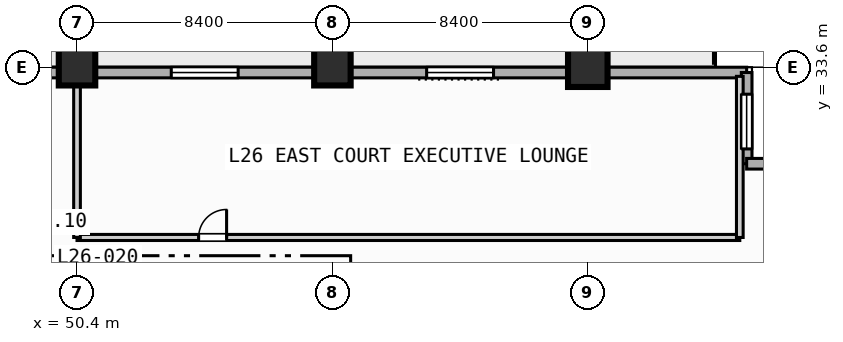
"""IFC4 building model, lengths in metres.
Left out: names, types, materials, properties, quantities, classifications, styles, units other than length and angle.
Written with IfcOpenShell. Run it as: python <this file> out.ifc"""

import sys

from ifc_helpers import new_model, si_unit, direction, frame, frame_2d, origin, origin_2d, place, context, subcontext, project, spatial, rectangle, extrude, element, fill, save


model = new_model("IFC4")
c1 = context("Model", 3, precision=1e-05, world=origin(), true_north=direction((0.0, 1.0)))
c2 = subcontext(c1, "Body", "Model", "MODEL_VIEW")
j1 = project(units=[si_unit("LENGTHUNIT", "METRE"), si_unit("PLANEANGLEUNIT", "RADIAN")], contexts=[c1])
p1 = place(None, origin())
s1 = spatial("IfcSite", under=j1, at=p1, CompositionType="ELEMENT")
p2 = place(p1, origin())
s2 = spatial("IfcBuilding", under=s1, at=p2, CompositionType="ELEMENT")
p3 = place(p2, frame((0.0, 0.0, 111.4)))
s3 = spatial("IfcBuildingStorey", under=s2, at=p3, CompositionType="ELEMENT", Elevation=111.4)
for number, where, z_axis, x_axis in (
    (1, (50.4, 33.6, 0.0), (0.0, 0.0, 1.0), (1.0, 0.0, 0.0)),
    (2, (58.8, 33.6, 0.0), (0.0, 0.0, 1.0), (1.0, 0.0, 0.0)),
):
    element("IfcColumn", number, at=place(p3, frame(where, z_axis=z_axis, x_axis=x_axis)), inside=s3, PredefinedType="COLUMN", context=c2, shape_type="SweptSolid", body=[
        extrude(rectangle(XDim=1.2, YDim=1.2, at=origin_2d()), origin(), (0.0, 0.0, 1.0), 3.8),
    ])
p4 = place(p3, frame((67.2, 33.6, 0.0), z_axis=(0.0, 0.0, 1.0), x_axis=(1.0, 0.0, 0.0)))
e3 = element("IfcColumn", 3, at=p4, inside=s3, PredefinedType="COLUMN", context=c2, shape_type="SweptSolid", body=[
    extrude(rectangle(XDim=1.3, YDim=1.3, at=origin_2d()), origin(), (0.0, 0.0, 1.0), 3.8),
])
p5 = place(p3, frame((33.425, 33.425, 0.0), z_axis=(0.0, 0.0, 1.0), x_axis=(1.0, 0.0, 0.0)))
e4 = element("IfcWall", 4, at=p5, inside=s3, PredefinedType="STANDARD", context=c2, shape_type="SweptSolid", body=[
    extrude(rectangle(XDim=39.0, YDim=0.35, at=frame_2d((19.5, 0.0))), origin(), (0.0, 0.0, 1.0), 3.55),
])
p6 = place(p5, frame((12.075, 0.0, 0.0)))
e5 = element("IfcOpeningElement", 5, at=p6, cuts=e4, PredefinedType="OPENING", context=c2, shape_type="SweptSolid", body=[
    extrude(rectangle(XDim=1.4, YDim=2.2, at=frame_2d((0.7, 1.1))), frame((0.0, 0.185, 0.0), z_axis=(0.0, -1.0, 0.0), x_axis=(1.0, 0.0, 0.0)), (0.0, 0.0, 1.0), 0.37),
])
p7 = place(p5, frame((20.075, 0.0, 0.85)))
e6 = element("IfcOpeningElement", 6, at=p7, cuts=e4, PredefinedType="OPENING", context=c2, shape_type="SweptSolid", body=[
    extrude(rectangle(XDim=2.2, YDim=1.8, at=frame_2d((1.1, 0.9))), frame((0.0, 0.185, 0.0), z_axis=(0.0, -1.0, 0.0), x_axis=(1.0, 0.0, 0.0)), (0.0, 0.0, 1.0), 0.37),
])
p8 = place(p5, frame((28.475, 0.0, 0.85)))
e7 = element("IfcOpeningElement", 7, at=p8, cuts=e4, PredefinedType="OPENING", context=c2, shape_type="SweptSolid", body=[
    extrude(rectangle(XDim=2.2, YDim=1.8, at=frame_2d((1.1, 0.9))), frame((0.0, 0.185, 0.0), z_axis=(0.0, -1.0, 0.0), x_axis=(1.0, 0.0, 0.0)), (0.0, 0.0, 1.0), 0.37),
])
p9 = place(p3, frame((72.425, 33.425, 0.0), z_axis=(0.0, 0.0, 1.0), x_axis=(0.0, -1.0, 0.0)))
e8 = element("IfcWall", 8, at=p9, inside=s3, PredefinedType="STANDARD", context=c2, shape_type="SweptSolid", body=[
    extrude(rectangle(XDim=3.0, YDim=0.35, at=frame_2d((1.5, 0.0))), origin(), (0.0, 0.0, 1.0), 3.55),
])
p10 = place(p9, frame((0.712, 0.0, 0.85)))
e9 = element("IfcOpeningElement", 9, at=p10, cuts=e8, PredefinedType="OPENING", context=c2, shape_type="SweptSolid", body=[
    extrude(rectangle(XDim=1.8, YDim=1.8, at=frame_2d((0.9, 0.9))), frame((0.0, 0.185, 0.0), z_axis=(0.0, -1.0, 0.0), x_axis=(1.0, 0.0, 0.0)), (0.0, 0.0, 1.0), 0.37),
])
p11 = place(p3, frame((72.425, 30.425, 0.0), z_axis=(0.0, 0.0, 1.0), x_axis=(1.0, 0.0, 0.0)))
e10 = element("IfcWall", 10, at=p11, inside=s3, PredefinedType="STANDARD", context=c2, shape_type="SweptSolid", body=[
    extrude(rectangle(XDim=3.0, YDim=0.35, at=frame_2d((1.5, 0.0))), origin(), (0.0, 0.0, 1.0), 3.55),
])
p12 = place(p3, frame((50.4, 28.0, 0.0), z_axis=(0.0, 0.0, 1.0), x_axis=(1.0, 0.0, 0.0)))
e11 = element("IfcWall", 11, at=p12, inside=s3, PredefinedType="PARTITIONING", context=c2, shape_type="SweptSolid", body=[
    extrude(rectangle(XDim=21.8, YDim=0.2, at=frame_2d((10.9, 0.0))), origin(), (0.0, 0.0, 1.0), 3.55),
])
p13 = place(p12, frame((4.0, 0.0, 0.0)))
e12 = element("IfcOpeningElement", 12, at=p13, cuts=e11, PredefinedType="OPENING", context=c2, shape_type="SweptSolid", body=[
    extrude(rectangle(XDim=0.92, YDim=2.1, at=frame_2d((0.46, 1.05))), frame((0.0, 0.11, 0.0), z_axis=(0.0, -1.0, 0.0), x_axis=(1.0, 0.0, 0.0)), (0.0, 0.0, 1.0), 0.22),
])
p14 = place(p3, frame((50.4, 28.0, 0.0), z_axis=(0.0, 0.0, 1.0), x_axis=(0.0, 1.0, 0.0)))
e13 = element("IfcWall", 13, at=p14, inside=s3, PredefinedType="PARTITIONING", context=c2, shape_type="SweptSolid", body=[
    extrude(rectangle(XDim=5.3, YDim=0.22, at=frame_2d((2.65, 0.0))), origin(), (0.0, 0.0, 1.0), 2.8),
])
p15 = place(p3, frame((72.2, 28.0, 0.0), z_axis=(0.0, 0.0, 1.0), x_axis=(0.0, 1.0, 0.0)))
e14 = element("IfcWall", 14, at=p15, inside=s3, PredefinedType="PARTITIONING", context=c2, shape_type="SweptSolid", body=[
    extrude(rectangle(XDim=5.3, YDim=0.22, at=frame_2d((2.65, 0.0))), origin(), (0.0, 0.0, 1.0), 3.55),
])
p16 = place(p7, origin())
e15 = element("IfcWindow", 15, at=p16, inside=s3, PartitioningType="SINGLE_PANEL", PredefinedType="WINDOW", context=c2, shape_type="SweptSolid", body=[
    extrude(rectangle(XDim=2.2, YDim=1.8, at=frame_2d((1.1, 0.9))), frame((0.0, 0.03, 0.0), z_axis=(0.0, -1.0, 0.0), x_axis=(1.0, 0.0, 0.0)), (0.0, 0.0, 1.0), 0.06),
])
fill(e6, e15)
p17 = place(p8, origin())
e16 = element("IfcWindow", 16, at=p17, inside=s3, PartitioningType="SINGLE_PANEL", PredefinedType="WINDOW", context=c2, shape_type="SweptSolid", body=[
    extrude(rectangle(XDim=2.2, YDim=1.8, at=frame_2d((1.1, 0.9))), frame((0.0, 0.03, 0.0), z_axis=(0.0, -1.0, 0.0), x_axis=(1.0, 0.0, 0.0)), (0.0, 0.0, 1.0), 0.06),
])
fill(e7, e16)
p18 = place(p10, origin())
e17 = element("IfcWindow", 17, at=p18, inside=s3, PartitioningType="SINGLE_PANEL", PredefinedType="WINDOW", context=c2, shape_type="SweptSolid", body=[
    extrude(rectangle(XDim=1.8, YDim=1.8, at=frame_2d((0.9, 0.9))), frame((0.0, 0.03, 0.0), z_axis=(0.0, -1.0, 0.0), x_axis=(1.0, 0.0, 0.0)), (0.0, 0.0, 1.0), 0.06),
])
fill(e9, e17)
p19 = place(p13, origin())
e18 = element("IfcDoor", 18, at=p19, inside=s3, OperationType="SINGLE_SWING_RIGHT", PredefinedType="DOOR", context=c2, shape_type="SweptSolid", body=[
    extrude(rectangle(XDim=0.92, YDim=2.1, at=frame_2d((0.46, 1.05))), frame((0.0, 0.025, 0.0), z_axis=(0.0, -1.0, 0.0), x_axis=(1.0, 0.0, 0.0)), (0.0, 0.0, 1.0), 0.05),
])
fill(e12, e18)
save(model, sys.argv[1])
